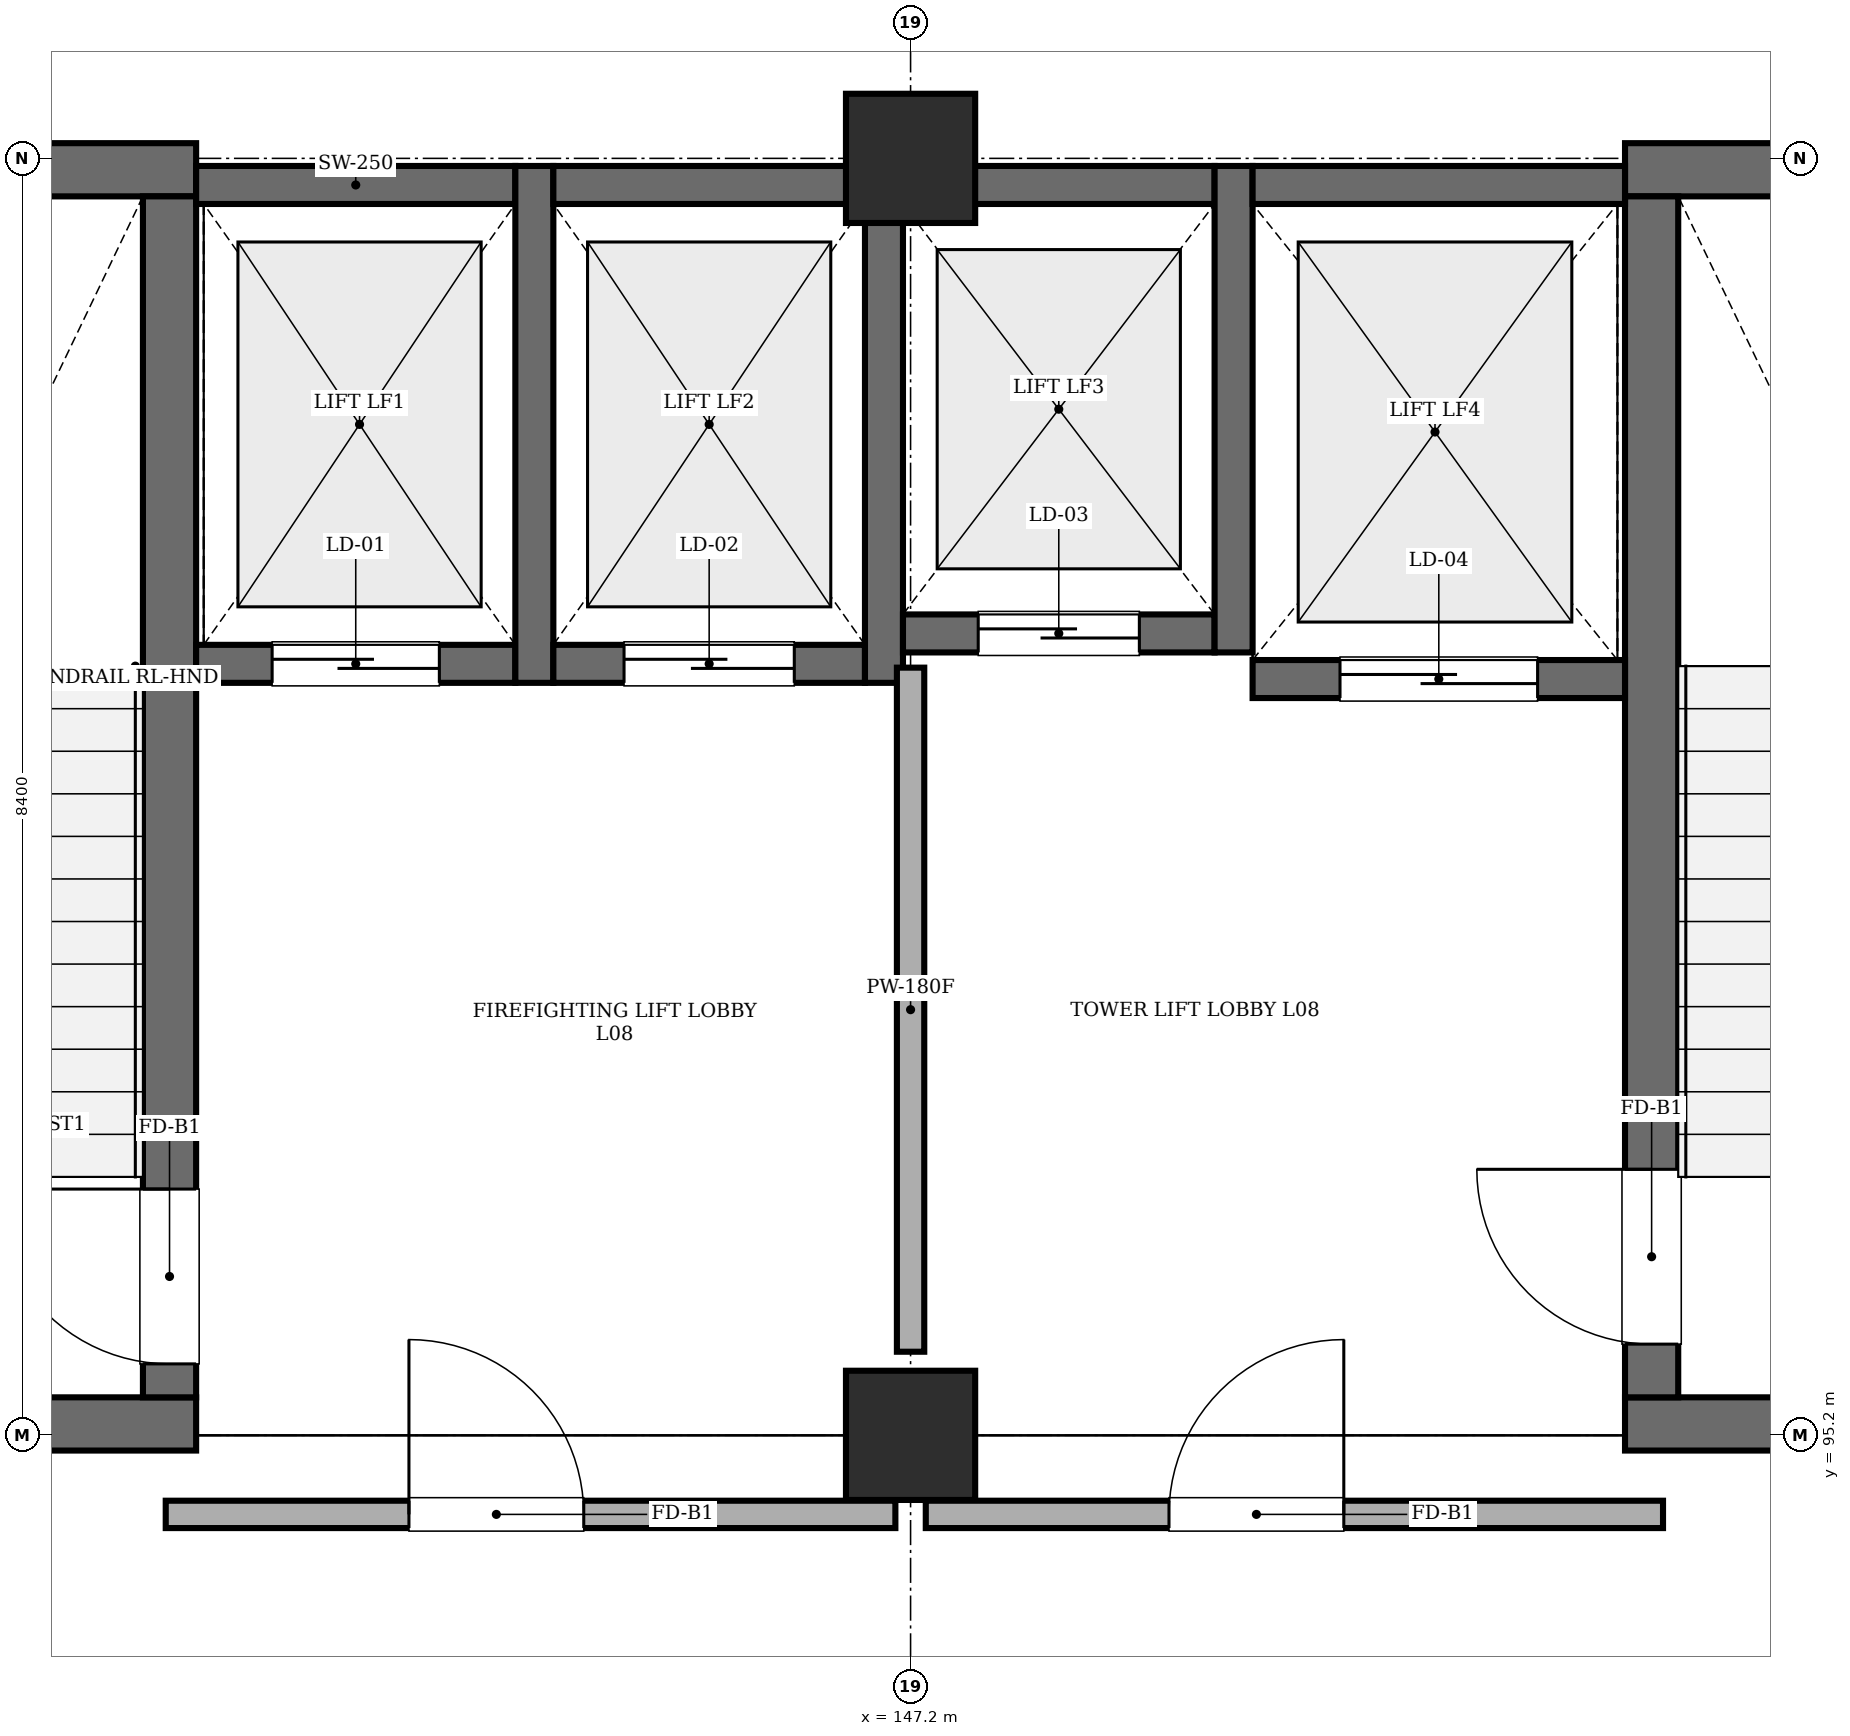
"""IFC4 building model, lengths in metres.
Left out: names, types, materials, properties, quantities, classifications, styles, units other than length and angle.
Written with IfcOpenShell. Run it as: python <this file> out.ifc"""

import sys

from ifc_helpers import new_model, si_unit, direction, frame, frame_2d, origin, origin_2d, place, context, subcontext, project, spatial, rectangle, extrude, element, fill, save


model = new_model("IFC4")
c1 = context("Model", 3, precision=1e-05, world=origin(), true_north=direction((0.0, 1.0)))
c2 = subcontext(c1, "Body", "Model", "MODEL_VIEW")
j1 = project(units=[si_unit("LENGTHUNIT", "METRE"), si_unit("PLANEANGLEUNIT", "RADIAN")], contexts=[c1])
p1 = place(None, origin())
s1 = spatial("IfcSite", under=j1, at=p1, CompositionType="ELEMENT")
p2 = place(p1, origin())
s2 = spatial("IfcBuilding", under=s1, at=p2, CompositionType="ELEMENT")
p3 = place(p2, frame((0.0, 0.0, 31.8)))
s3 = spatial("IfcBuildingStorey", under=s2, at=p3, CompositionType="ELEMENT", Elevation=31.8)
for number, where, z_axis, x_axis in (
    (1, (147.2, 95.2, 0.0), (0.0, 0.0, 1.0), (1.0, 0.0, 0.0)),
    (2, (147.2, 103.6, 0.0), (0.0, 0.0, 1.0), (1.0, 0.0, 0.0)),
):
    element("IfcColumn", number, at=place(p3, frame(where, z_axis=z_axis, x_axis=x_axis)), inside=s3, PredefinedType="COLUMN", context=c2, shape_type="SweptSolid", body=[
        extrude(rectangle(XDim=0.85, YDim=0.85, at=origin_2d()), origin(), (0.0, 0.0, 1.0), 4.02),
    ])
for number, where, z_axis, x_axis in (
    (3, (138.7, 95.275, 0.0), (0.0, 0.0, 1.0), (1.0, 0.0, 0.0)),
    (4, (138.7, 103.525, 0.0), (0.0, 0.0, 1.0), (1.0, 0.0, 0.0)),
):
    element("IfcWall", number, at=place(p3, frame(where, z_axis=z_axis, x_axis=x_axis)), inside=s3, PredefinedType="SHEAR", context=c2, shape_type="SweptSolid", body=[
        extrude(rectangle(XDim=3.8, YDim=0.35, at=frame_2d((1.9, 0.0))), origin(), (0.0, 0.0, 1.0), 4.02),
    ])
p4 = place(p3, frame((142.325, 95.45, 0.0), z_axis=(0.0, 0.0, 1.0), x_axis=(0.0, 1.0, 0.0)))
e5 = element("IfcWall", 5, at=p4, inside=s3, PredefinedType="SHEAR", context=c2, shape_type="SweptSolid", body=[
    extrude(rectangle(XDim=7.9, YDim=0.35, at=frame_2d((3.95, 0.0))), origin(), (0.0, 0.0, 1.0), 4.02),
])
p5 = place(p4, frame((0.22, 0.0, 0.0)))
e6 = element("IfcOpeningElement", 6, at=p5, cuts=e5, PredefinedType="OPENING", context=c2, shape_type="SweptSolid", body=[
    extrude(rectangle(XDim=1.15, YDim=2.15, at=frame_2d((0.575, 1.075))), frame((0.0, 0.185, 0.0), z_axis=(0.0, -1.0, 0.0), x_axis=(1.0, 0.0, 0.0)), (0.0, 0.0, 1.0), 0.37),
])
for number, where, z_axis, x_axis in (
    (7, (151.9, 95.275, 0.0), (0.0, 0.0, 1.0), (1.0, 0.0, 0.0)),
    (8, (151.9, 103.525, 0.0), (0.0, 0.0, 1.0), (1.0, 0.0, 0.0)),
):
    element("IfcWall", number, at=place(p3, frame(where, z_axis=z_axis, x_axis=x_axis)), inside=s3, PredefinedType="SHEAR", context=c2, shape_type="SweptSolid", body=[
        extrude(rectangle(XDim=3.8, YDim=0.35, at=frame_2d((1.9, 0.0))), origin(), (0.0, 0.0, 1.0), 4.02),
    ])
p6 = place(p3, frame((152.075, 95.45, 0.0), z_axis=(0.0, 0.0, 1.0), x_axis=(0.0, 1.0, 0.0)))
e9 = element("IfcWall", 9, at=p6, inside=s3, PredefinedType="SHEAR", context=c2, shape_type="SweptSolid", body=[
    extrude(rectangle(XDim=7.9, YDim=0.35, at=frame_2d((3.95, 0.0))), origin(), (0.0, 0.0, 1.0), 4.02),
])
p7 = place(p6, frame((0.35, 0.0, 0.0)))
e10 = element("IfcOpeningElement", 10, at=p7, cuts=e9, PredefinedType="OPENING", context=c2, shape_type="SweptSolid", body=[
    extrude(rectangle(XDim=1.15, YDim=2.15, at=frame_2d((0.575, 1.075))), frame((0.0, 0.185, 0.0), z_axis=(0.0, -1.0, 0.0), x_axis=(1.0, 0.0, 0.0)), (0.0, 0.0, 1.0), 0.37),
])
p8 = place(p3, frame((142.5, 100.275, 0.0), z_axis=(0.0, 0.0, 1.0), x_axis=(1.0, 0.0, 0.0)))
e11 = element("IfcWall", 11, at=p8, inside=s3, PredefinedType="SHEAR", context=c2, shape_type="SweptSolid", body=[
    extrude(rectangle(XDim=2.1, YDim=0.25, at=frame_2d((1.05, 0.0))), origin(), (0.0, 0.0, 1.0), 4.02),
])
p9 = place(p8, frame((0.5, 0.0, 0.0)))
e12 = element("IfcOpeningElement", 12, at=p9, cuts=e11, PredefinedType="OPENING", context=c2, shape_type="SweptSolid", body=[
    extrude(rectangle(XDim=1.1, YDim=2.15, at=frame_2d((0.55, 1.075))), frame((0.0, 0.135, 0.0), z_axis=(0.0, -1.0, 0.0), x_axis=(1.0, 0.0, 0.0)), (0.0, 0.0, 1.0), 0.27),
])
p10 = place(p3, frame((142.5, 103.425, 0.0), z_axis=(0.0, 0.0, 1.0), x_axis=(1.0, 0.0, 0.0)))
e13 = element("IfcWall", 13, at=p10, inside=s3, PredefinedType="SHEAR", context=c2, shape_type="SweptSolid", body=[
    extrude(rectangle(XDim=2.1, YDim=0.25, at=frame_2d((1.05, 0.0))), origin(), (0.0, 0.0, 1.0), 4.02),
])
p11 = place(p3, frame((144.725, 100.15, 0.0), z_axis=(0.0, 0.0, 1.0), x_axis=(0.0, 1.0, 0.0)))
e14 = element("IfcWall", 14, at=p11, inside=s3, PredefinedType="SHEAR", context=c2, shape_type="SweptSolid", body=[
    extrude(rectangle(XDim=3.4, YDim=0.25, at=frame_2d((1.7, 0.0))), origin(), (0.0, 0.0, 1.0), 4.02),
])
p12 = place(p3, frame((144.85, 100.275, 0.0), z_axis=(0.0, 0.0, 1.0), x_axis=(1.0, 0.0, 0.0)))
e15 = element("IfcWall", 15, at=p12, inside=s3, PredefinedType="SHEAR", context=c2, shape_type="SweptSolid", body=[
    extrude(rectangle(XDim=2.05, YDim=0.25, at=frame_2d((1.025, 0.0))), origin(), (0.0, 0.0, 1.0), 4.02),
])
p13 = place(p12, frame((0.465, 0.0, 0.0)))
e16 = element("IfcOpeningElement", 16, at=p13, cuts=e15, PredefinedType="OPENING", context=c2, shape_type="SweptSolid", body=[
    extrude(rectangle(XDim=1.12, YDim=2.15, at=frame_2d((0.56, 1.075))), frame((0.0, 0.135, 0.0), z_axis=(0.0, -1.0, 0.0), x_axis=(1.0, 0.0, 0.0)), (0.0, 0.0, 1.0), 0.27),
])
p14 = place(p3, frame((144.85, 103.425, 0.0), z_axis=(0.0, 0.0, 1.0), x_axis=(1.0, 0.0, 0.0)))
e17 = element("IfcWall", 17, at=p14, inside=s3, PredefinedType="SHEAR", context=c2, shape_type="SweptSolid", body=[
    extrude(rectangle(XDim=2.05, YDim=0.25, at=frame_2d((1.025, 0.0))), origin(), (0.0, 0.0, 1.0), 4.02),
])
p15 = place(p3, frame((147.025, 100.15, 0.0), z_axis=(0.0, 0.0, 1.0), x_axis=(0.0, 1.0, 0.0)))
e18 = element("IfcWall", 18, at=p15, inside=s3, PredefinedType="SHEAR", context=c2, shape_type="SweptSolid", body=[
    extrude(rectangle(XDim=3.4, YDim=0.25, at=frame_2d((1.7, 0.0))), origin(), (0.0, 0.0, 1.0), 4.02),
])
p16 = place(p3, frame((147.15, 100.475, 0.0), z_axis=(0.0, 0.0, 1.0), x_axis=(1.0, 0.0, 0.0)))
e19 = element("IfcWall", 19, at=p16, inside=s3, PredefinedType="SHEAR", context=c2, shape_type="SweptSolid", body=[
    extrude(rectangle(XDim=2.05, YDim=0.25, at=frame_2d((1.025, 0.0))), origin(), (0.0, 0.0, 1.0), 4.02),
])
p17 = place(p16, frame((0.495, 0.0, 0.0)))
e20 = element("IfcOpeningElement", 20, at=p17, cuts=e19, PredefinedType="OPENING", context=c2, shape_type="SweptSolid", body=[
    extrude(rectangle(XDim=1.06, YDim=2.15, at=frame_2d((0.53, 1.075))), frame((0.0, 0.135, 0.0), z_axis=(0.0, -1.0, 0.0), x_axis=(1.0, 0.0, 0.0)), (0.0, 0.0, 1.0), 0.27),
])
p18 = place(p3, frame((147.15, 103.425, 0.0), z_axis=(0.0, 0.0, 1.0), x_axis=(1.0, 0.0, 0.0)))
e21 = element("IfcWall", 21, at=p18, inside=s3, PredefinedType="SHEAR", context=c2, shape_type="SweptSolid", body=[
    extrude(rectangle(XDim=2.05, YDim=0.25, at=frame_2d((1.025, 0.0))), origin(), (0.0, 0.0, 1.0), 4.02),
])
p19 = place(p3, frame((149.325, 100.35, 0.0), z_axis=(0.0, 0.0, 1.0), x_axis=(0.0, 1.0, 0.0)))
e22 = element("IfcWall", 22, at=p19, inside=s3, PredefinedType="SHEAR", context=c2, shape_type="SweptSolid", body=[
    extrude(rectangle(XDim=3.2, YDim=0.25, at=frame_2d((1.6, 0.0))), origin(), (0.0, 0.0, 1.0), 4.02),
])
p20 = place(p3, frame((149.45, 100.175, 0.0), z_axis=(0.0, 0.0, 1.0), x_axis=(1.0, 0.0, 0.0)))
e23 = element("IfcWall", 23, at=p20, inside=s3, PredefinedType="SHEAR", context=c2, shape_type="SweptSolid", body=[
    extrude(rectangle(XDim=2.45, YDim=0.25, at=frame_2d((1.225, 0.0))), origin(), (0.0, 0.0, 1.0), 4.02),
])
p21 = place(p20, frame((0.575, 0.0, 0.0)))
e24 = element("IfcOpeningElement", 24, at=p21, cuts=e23, PredefinedType="OPENING", context=c2, shape_type="SweptSolid", body=[
    extrude(rectangle(XDim=1.3, YDim=2.25, at=frame_2d((0.65, 1.125))), frame((0.0, 0.135, 0.0), z_axis=(0.0, -1.0, 0.0), x_axis=(1.0, 0.0, 0.0)), (0.0, 0.0, 1.0), 0.27),
])
p22 = place(p3, frame((149.45, 103.425, 0.0), z_axis=(0.0, 0.0, 1.0), x_axis=(1.0, 0.0, 0.0)))
e25 = element("IfcWall", 25, at=p22, inside=s3, PredefinedType="SHEAR", context=c2, shape_type="SweptSolid", body=[
    extrude(rectangle(XDim=2.45, YDim=0.25, at=frame_2d((1.225, 0.0))), origin(), (0.0, 0.0, 1.0), 4.02),
])
p23 = place(p3, frame((142.3, 94.68, 0.0), z_axis=(0.0, 0.0, 1.0), x_axis=(1.0, 0.0, 0.0)))
e26 = element("IfcWall", 26, at=p23, inside=s3, PredefinedType="STANDARD", context=c2, shape_type="SweptSolid", body=[
    extrude(rectangle(XDim=4.8, YDim=0.18, at=frame_2d((2.4, 0.0))), origin(), (0.0, 0.0, 1.0), 4.02),
])
p24 = place(p23, frame((1.6, 0.0, 0.0)))
e27 = element("IfcOpeningElement", 27, at=p24, cuts=e26, PredefinedType="OPENING", context=c2, shape_type="SweptSolid", body=[
    extrude(rectangle(XDim=1.15, YDim=2.15, at=frame_2d((0.575, 1.075))), frame((0.0, 0.1, 0.0), z_axis=(0.0, -1.0, 0.0), x_axis=(1.0, 0.0, 0.0)), (0.0, 0.0, 1.0), 0.2),
])
p25 = place(p3, frame((147.3, 94.68, 0.0), z_axis=(0.0, 0.0, 1.0), x_axis=(1.0, 0.0, 0.0)))
e28 = element("IfcWall", 28, at=p25, inside=s3, PredefinedType="STANDARD", context=c2, shape_type="SweptSolid", body=[
    extrude(rectangle(XDim=4.85, YDim=0.18, at=frame_2d((2.425, 0.0))), origin(), (0.0, 0.0, 1.0), 4.02),
])
p26 = place(p25, frame((1.6, 0.0, 0.0)))
e29 = element("IfcOpeningElement", 29, at=p26, cuts=e28, PredefinedType="OPENING", context=c2, shape_type="SweptSolid", body=[
    extrude(rectangle(XDim=1.15, YDim=2.15, at=frame_2d((0.575, 1.075))), frame((0.0, 0.1, 0.0), z_axis=(0.0, -1.0, 0.0), x_axis=(1.0, 0.0, 0.0)), (0.0, 0.0, 1.0), 0.2),
])
p27 = place(p3, frame((147.2, 95.75, 0.0), z_axis=(0.0, 0.0, 1.0), x_axis=(0.0, 1.0, 0.0)))
e30 = element("IfcWall", 30, at=p27, inside=s3, PredefinedType="STANDARD", context=c2, shape_type="SweptSolid", body=[
    extrude(rectangle(XDim=4.5, YDim=0.18, at=frame_2d((2.25, 0.0))), origin(), (0.0, 0.0, 1.0), 3.32),
])
p28 = place(p24, origin())
e31 = element("IfcDoor", 31, at=p28, inside=s3, OperationType="SINGLE_SWING_LEFT", PredefinedType="DOOR", context=c2, shape_type="SweptSolid", body=[
    extrude(rectangle(XDim=1.15, YDim=2.15, at=frame_2d((0.575, 1.075))), frame((0.0, 0.025, 0.0), z_axis=(0.0, -1.0, 0.0), x_axis=(1.0, 0.0, 0.0)), (0.0, 0.0, 1.0), 0.05),
])
fill(e27, e31)
p29 = place(p26, origin())
e32 = element("IfcDoor", 32, at=p29, inside=s3, OperationType="SINGLE_SWING_RIGHT", PredefinedType="DOOR", context=c2, shape_type="SweptSolid", body=[
    extrude(rectangle(XDim=1.15, YDim=2.15, at=frame_2d((0.575, 1.075))), frame((0.0, 0.025, 0.0), z_axis=(0.0, -1.0, 0.0), x_axis=(1.0, 0.0, 0.0)), (0.0, 0.0, 1.0), 0.05),
])
fill(e29, e32)
p30 = place(p5, origin())
e33 = element("IfcDoor", 33, at=p30, inside=s3, OperationType="SINGLE_SWING_RIGHT", PredefinedType="DOOR", context=c2, shape_type="SweptSolid", body=[
    extrude(rectangle(XDim=1.15, YDim=2.15, at=frame_2d((0.575, 1.075))), frame((0.0, 0.025, 0.0), z_axis=(0.0, -1.0, 0.0), x_axis=(1.0, 0.0, 0.0)), (0.0, 0.0, 1.0), 0.05),
])
fill(e6, e33)
p31 = place(p7, origin())
e34 = element("IfcDoor", 34, at=p31, inside=s3, OperationType="SINGLE_SWING_RIGHT", PredefinedType="DOOR", context=c2, shape_type="SweptSolid", body=[
    extrude(rectangle(XDim=1.15, YDim=2.15, at=frame_2d((0.575, 1.075))), frame((0.0, 0.025, 0.0), z_axis=(0.0, -1.0, 0.0), x_axis=(1.0, 0.0, 0.0)), (0.0, 0.0, 1.0), 0.05),
])
fill(e10, e34)
p32 = place(p9, origin())
e35 = element("IfcDoor", 35, at=p32, inside=s3, OperationType="SLIDING_TO_LEFT", PredefinedType="DOOR", context=c2, shape_type="SweptSolid", body=[
    extrude(rectangle(XDim=1.1, YDim=2.15, at=frame_2d((0.55, 1.075))), frame((0.0, 0.025, 0.0), z_axis=(0.0, -1.0, 0.0), x_axis=(1.0, 0.0, 0.0)), (0.0, 0.0, 1.0), 0.05),
])
fill(e12, e35)
p33 = place(p13, origin())
e36 = element("IfcDoor", 36, at=p33, inside=s3, OperationType="SLIDING_TO_LEFT", PredefinedType="DOOR", context=c2, shape_type="SweptSolid", body=[
    extrude(rectangle(XDim=1.12, YDim=2.15, at=frame_2d((0.56, 1.075))), frame((0.0, 0.025, 0.0), z_axis=(0.0, -1.0, 0.0), x_axis=(1.0, 0.0, 0.0)), (0.0, 0.0, 1.0), 0.05),
])
fill(e16, e36)
p34 = place(p17, origin())
e37 = element("IfcDoor", 37, at=p34, inside=s3, OperationType="SLIDING_TO_LEFT", PredefinedType="DOOR", context=c2, shape_type="SweptSolid", body=[
    extrude(rectangle(XDim=1.06, YDim=2.15, at=frame_2d((0.53, 1.075))), frame((0.0, 0.025, 0.0), z_axis=(0.0, -1.0, 0.0), x_axis=(1.0, 0.0, 0.0)), (0.0, 0.0, 1.0), 0.05),
])
fill(e20, e37)
p35 = place(p21, origin())
e38 = element("IfcDoor", 38, at=p35, inside=s3, OperationType="SLIDING_TO_LEFT", PredefinedType="DOOR", context=c2, shape_type="SweptSolid", body=[
    extrude(rectangle(XDim=1.3, YDim=2.25, at=frame_2d((0.65, 1.125))), frame((0.0, 0.025, 0.0), z_axis=(0.0, -1.0, 0.0), x_axis=(1.0, 0.0, 0.0)), (0.0, 0.0, 1.0), 0.05),
])
fill(e24, e38)
save(model, sys.argv[1])
